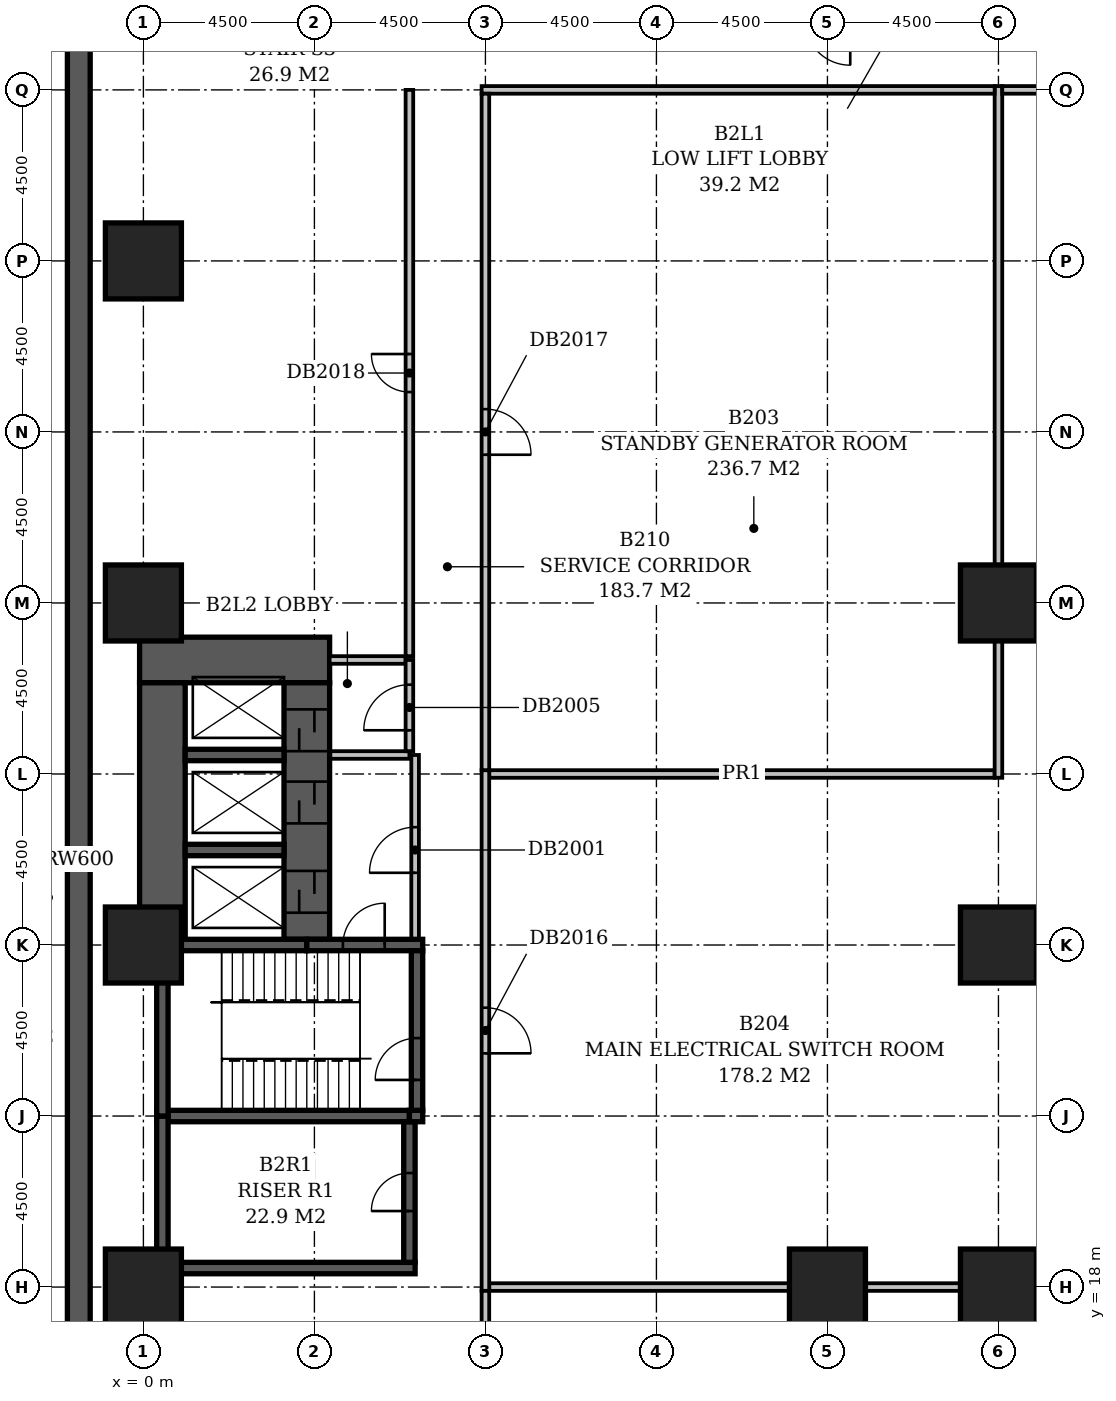
"""IFC4 building model, lengths in metres.
Left out: names, types, materials, properties, quantities, classifications, styles, units other than length and angle.
Written with IfcOpenShell. Run it as: python <this file> out.ifc"""

import sys

from ifc_helpers import new_model, si_unit, direction, frame, frame_2d, origin, origin_2d, place, context, subcontext, project, spatial, rectangle, extrude, element, fill, save


model = new_model("IFC4")
c1 = context("Model", 3, precision=1e-05, world=origin(), true_north=direction((0.0, 1.0)))
c2 = subcontext(c1, "Body", "Model", "MODEL_VIEW")
j1 = project(units=[si_unit("LENGTHUNIT", "METRE"), si_unit("PLANEANGLEUNIT", "RADIAN")], contexts=[c1])
p1 = place(None, origin())
s1 = spatial("IfcSite", under=j1, at=p1, CompositionType="ELEMENT")
p2 = place(p1, origin())
s2 = spatial("IfcBuilding", under=s1, at=p2, CompositionType="ELEMENT")
p3 = place(p2, frame((0.0, 0.0, -9.0)))
s3 = spatial("IfcBuildingStorey", under=s2, at=p3, CompositionType="ELEMENT", Elevation=-9.0)
for number, where, z_axis, x_axis in (
    (1, (0.0, 18.0, 0.0), (0.0, 0.0, 1.0), (1.0, 0.0, 0.0)),
    (2, (18.0, 18.0, 0.0), (0.0, 0.0, 1.0), (1.0, 0.0, 0.0)),
    (3, (22.5, 18.0, 0.0), (0.0, 0.0, 1.0), (1.0, 0.0, 0.0)),
    (4, (0.0, 27.0, 0.0), (0.0, 0.0, 1.0), (1.0, 0.0, 0.0)),
    (5, (22.5, 27.0, 0.0), (0.0, 0.0, 1.0), (1.0, 0.0, 0.0)),
    (6, (0.0, 36.0, 0.0), (0.0, 0.0, 1.0), (1.0, 0.0, 0.0)),
    (7, (22.5, 36.0, 0.0), (0.0, 0.0, 1.0), (1.0, 0.0, 0.0)),
    (8, (0.0, 45.0, 0.0), (0.0, 0.0, 1.0), (1.0, 0.0, 0.0)),
):
    element("IfcColumn", number, at=place(p3, frame(where, z_axis=z_axis, x_axis=x_axis)), inside=s3, PredefinedType="COLUMN", context=c2, shape_type="SweptSolid", body=[
        extrude(rectangle(XDim=2.0, YDim=2.0, at=origin_2d()), origin(), (0.0, 0.0, 1.0), 4.1),
    ])
p4 = place(p3, frame((-1.7, -1.4, 0.0), z_axis=(0.0, 0.0, 1.0), x_axis=(0.0, 1.0, 0.0)))
e9 = element("IfcWall", 9, at=p4, inside=s3, PredefinedType="SOLIDWALL", context=c2, shape_type="SweptSolid", body=[
    extrude(rectangle(XDim=61.3, YDim=0.6, at=frame_2d((30.65, 0.0))), origin(), (0.0, 0.0, 1.0), 4.1),
])
p5 = place(p3, frame((0.35, 18.5, 0.0), z_axis=(0.0, 0.0, 1.0), x_axis=(1.0, 0.0, 0.0)))
e10 = element("IfcWall", 10, at=p5, inside=s3, PredefinedType="SHEAR", context=c2, shape_type="SweptSolid", body=[
    extrude(rectangle(XDim=6.8, YDim=0.3, at=frame_2d((3.4, 0.0))), origin(), (0.0, 0.0, 1.0), 4.1),
])
p6 = place(p3, frame((0.35, 22.5, 0.0), z_axis=(0.0, 0.0, 1.0), x_axis=(1.0, 0.0, 0.0)))
e11 = element("IfcWall", 11, at=p6, inside=s3, PredefinedType="SHEAR", context=c2, shape_type="SweptSolid", body=[
    extrude(rectangle(XDim=6.65, YDim=0.3, at=frame_2d((3.325, 0.0))), origin(), (0.0, 0.0, 1.0), 4.1),
])
p7 = place(p3, frame((7.0, 22.5, 0.0), z_axis=(0.0, 0.0, 1.0), x_axis=(1.0, 0.0, 0.0)))
e12 = element("IfcWall", 12, at=p7, inside=s3, PredefinedType="SHEAR", context=c2, shape_type="SweptSolid", body=[
    extrude(rectangle(XDim=0.35, YDim=0.3, at=frame_2d((0.175, 0.0))), origin(), (0.0, 0.0, 1.0), 4.1),
])
p8 = place(p3, frame((0.35, 27.0, 0.0), z_axis=(0.0, 0.0, 1.0), x_axis=(1.0, 0.0, 0.0)))
e13 = element("IfcWall", 13, at=p8, inside=s3, PredefinedType="SHEAR", context=c2, shape_type="SweptSolid", body=[
    extrude(rectangle(XDim=3.95, YDim=0.3, at=frame_2d((1.975, 0.0))), origin(), (0.0, 0.0, 1.0), 4.1),
])
p9 = place(p3, frame((4.3, 27.0, 0.0), z_axis=(0.0, 0.0, 1.0), x_axis=(1.0, 0.0, 0.0)))
e14 = element("IfcWall", 14, at=p9, inside=s3, PredefinedType="SHEAR", context=c2, shape_type="SweptSolid", body=[
    extrude(rectangle(XDim=3.05, YDim=0.3, at=frame_2d((1.525, 0.0))), origin(), (0.0, 0.0, 1.0), 4.1),
])
p10 = place(p9, frame((0.95, 0.0, 0.0)))
e15 = element("IfcOpeningElement", 15, at=p10, cuts=e14, PredefinedType="OPENING", context=c2, shape_type="SweptSolid", body=[
    extrude(rectangle(XDim=1.1, YDim=2.1, at=frame_2d((0.55, 1.05))), frame((0.0, 0.162, 0.0), z_axis=(0.0, -1.0, 0.0), x_axis=(1.0, 0.0, 0.0)), (0.0, 0.0, 1.0), 0.324),
])
for number, where, z_axis, x_axis in (
    (16, (1.1, 29.5, 0.0), (0.0, 0.0, 1.0), (1.0, 0.0, 0.0)),
    (17, (1.1, 32.0, 0.0), (0.0, 0.0, 1.0), (1.0, 0.0, 0.0)),
):
    element("IfcWall", number, at=place(p3, frame(where, z_axis=z_axis, x_axis=x_axis)), inside=s3, PredefinedType="SHEAR", context=c2, shape_type="SweptSolid", body=[
        extrude(rectangle(XDim=2.6, YDim=0.3, at=frame_2d((1.3, 0.0))), origin(), (0.0, 0.0, 1.0), 4.1),
    ])
p11 = place(p3, frame((-0.1, 34.5, 0.0), z_axis=(0.0, 0.0, 1.0), x_axis=(1.0, 0.0, 0.0)))
e18 = element("IfcWall", 18, at=p11, inside=s3, PredefinedType="SHEAR", context=c2, shape_type="SweptSolid", body=[
    extrude(rectangle(XDim=5.0, YDim=1.2, at=frame_2d((2.5, 0.0))), origin(), (0.0, 0.0, 1.0), 4.1),
])
p12 = place(p3, frame((0.5, 18.65, 0.0), z_axis=(0.0, 0.0, 1.0), x_axis=(0.0, 1.0, 0.0)))
e19 = element("IfcWall", 19, at=p12, inside=s3, PredefinedType="SHEAR", context=c2, shape_type="SweptSolid", body=[
    extrude(rectangle(XDim=3.85, YDim=0.3, at=frame_2d((1.925, 0.0))), origin(), (0.0, 0.0, 1.0), 4.1),
])
p13 = place(p3, frame((0.5, 22.5, 0.0), z_axis=(0.0, 0.0, 1.0), x_axis=(0.0, 1.0, 0.0)))
e20 = element("IfcWall", 20, at=p13, inside=s3, PredefinedType="SHEAR", context=c2, shape_type="SweptSolid", body=[
    extrude(rectangle(XDim=4.5, YDim=0.3, at=frame_2d((2.25, 0.0))), origin(), (0.0, 0.0, 1.0), 4.1),
])
p14 = place(p3, frame((0.5, 27.0, 0.0), z_axis=(0.0, 0.0, 1.0), x_axis=(0.0, 1.0, 0.0)))
e21 = element("IfcWall", 21, at=p14, inside=s3, PredefinedType="SHEAR", context=c2, shape_type="SweptSolid", body=[
    extrude(rectangle(XDim=6.9, YDim=1.2, at=frame_2d((3.45, 0.0))), origin(), (0.0, 0.0, 1.0), 4.1),
])
p15 = place(p3, frame((4.3, 27.15, 0.0), z_axis=(0.0, 0.0, 1.0), x_axis=(0.0, 1.0, 0.0)))
e22 = element("IfcWall", 22, at=p15, inside=s3, PredefinedType="SHEAR", context=c2, shape_type="SweptSolid", body=[
    extrude(rectangle(XDim=6.75, YDim=1.2, at=frame_2d((3.375, 0.0))), origin(), (0.0, 0.0, 1.0), 4.1),
])
p16 = place(p15, frame((3.05, 0.0, 0.0)))
e23 = element("IfcOpeningElement", 23, at=p16, cuts=e22, PredefinedType="OPENING", context=c2, shape_type="SweptSolid", body=[
    extrude(rectangle(XDim=1.1, YDim=2.1, at=frame_2d((0.55, 1.05))), frame((0.0, 0.612, 0.0), z_axis=(0.0, -1.0, 0.0), x_axis=(1.0, 0.0, 0.0)), (0.0, 0.0, 1.0), 1.224),
])
p17 = place(p15, frame((0.7, 0.0, 0.0)))
e24 = element("IfcOpeningElement", 24, at=p17, cuts=e22, PredefinedType="OPENING", context=c2, shape_type="SweptSolid", body=[
    extrude(rectangle(XDim=1.1, YDim=2.1, at=frame_2d((0.55, 1.05))), frame((0.0, 0.612, 0.0), z_axis=(0.0, -1.0, 0.0), x_axis=(1.0, 0.0, 0.0)), (0.0, 0.0, 1.0), 1.224),
])
p18 = place(p15, frame((4.95, 0.0, 0.0)))
e25 = element("IfcOpeningElement", 25, at=p18, cuts=e22, PredefinedType="OPENING", context=c2, shape_type="SweptSolid", body=[
    extrude(rectangle(XDim=1.1, YDim=2.1, at=frame_2d((0.55, 1.05))), frame((0.0, 0.612, 0.0), z_axis=(0.0, -1.0, 0.0), x_axis=(1.0, 0.0, 0.0)), (0.0, 0.0, 1.0), 1.224),
])
p19 = place(p3, frame((7.0, 18.65, 0.0), z_axis=(0.0, 0.0, 1.0), x_axis=(0.0, 1.0, 0.0)))
e26 = element("IfcWall", 26, at=p19, inside=s3, PredefinedType="SHEAR", context=c2, shape_type="SweptSolid", body=[
    extrude(rectangle(XDim=3.7, YDim=0.3, at=frame_2d((1.85, 0.0))), origin(), (0.0, 0.0, 1.0), 4.1),
])
p20 = place(p19, frame((1.35, 0.0, 0.0)))
e27 = element("IfcOpeningElement", 27, at=p20, cuts=e26, PredefinedType="OPENING", context=c2, shape_type="SweptSolid", body=[
    extrude(rectangle(XDim=1.0, YDim=2.1, at=frame_2d((0.5, 1.05))), frame((0.0, 0.162, 0.0), z_axis=(0.0, -1.0, 0.0), x_axis=(1.0, 0.0, 0.0)), (0.0, 0.0, 1.0), 0.324),
])
p21 = place(p3, frame((7.2, 22.65, 0.0), z_axis=(0.0, 0.0, 1.0), x_axis=(0.0, 1.0, 0.0)))
e28 = element("IfcWall", 28, at=p21, inside=s3, PredefinedType="SHEAR", context=c2, shape_type="SweptSolid", body=[
    extrude(rectangle(XDim=4.2, YDim=0.3, at=frame_2d((2.1, 0.0))), origin(), (0.0, 0.0, 1.0), 4.1),
])
p22 = place(p21, frame((0.8, 0.0, 0.0)))
e29 = element("IfcOpeningElement", 29, at=p22, cuts=e28, PredefinedType="OPENING", context=c2, shape_type="SweptSolid", body=[
    extrude(rectangle(XDim=1.1, YDim=2.1, at=frame_2d((0.55, 1.05))), frame((0.0, 0.162, 0.0), z_axis=(0.0, -1.0, 0.0), x_axis=(1.0, 0.0, 0.0)), (0.0, 0.0, 1.0), 0.324),
])
p23 = place(p3, frame((4.92, 32.0, 0.0), z_axis=(0.0, 0.0, 1.0), x_axis=(1.0, 0.0, 0.0)))
e30 = element("IfcWall", 30, at=p23, inside=s3, PredefinedType="PARTITIONING", context=c2, shape_type="SweptSolid", body=[
    extrude(rectangle(XDim=2.08, YDim=0.2, at=frame_2d((1.04, 0.0))), origin(), (0.0, 0.0, 1.0), 4.1),
])
p24 = place(p3, frame((7.0, 32.1, 0.0), z_axis=(0.0, 0.0, 1.0), x_axis=(0.0, 1.0, 0.0)))
e31 = element("IfcWall", 31, at=p24, inside=s3, PredefinedType="PARTITIONING", context=c2, shape_type="SweptSolid", body=[
    extrude(rectangle(XDim=2.4, YDim=0.2, at=frame_2d((1.2, 0.0))), origin(), (0.0, 0.0, 1.0), 4.1),
])
p25 = place(p24, frame((0.55, 0.0, 0.0)))
e32 = element("IfcOpeningElement", 32, at=p25, cuts=e31, PredefinedType="OPENING", context=c2, shape_type="SweptSolid", body=[
    extrude(rectangle(XDim=1.2, YDim=2.1, at=frame_2d((0.6, 1.05))), frame((0.0, 0.112, 0.0), z_axis=(0.0, -1.0, 0.0), x_axis=(1.0, 0.0, 0.0)), (0.0, 0.0, 1.0), 0.224),
])
p26 = place(p3, frame((4.9, 34.5, 0.0), z_axis=(0.0, 0.0, 1.0), x_axis=(1.0, 0.0, 0.0)))
e33 = element("IfcWall", 33, at=p26, inside=s3, PredefinedType="PARTITIONING", context=c2, shape_type="SweptSolid", body=[
    extrude(rectangle(XDim=2.0, YDim=0.2, at=frame_2d((1.0, 0.0))), origin(), (0.0, 0.0, 1.0), 4.1),
])
p27 = place(p3, frame((7.15, 27.17, 0.0), z_axis=(0.0, 0.0, 1.0), x_axis=(0.0, 1.0, 0.0)))
e34 = element("IfcWall", 34, at=p27, inside=s3, PredefinedType="PARTITIONING", context=c2, shape_type="SweptSolid", body=[
    extrude(rectangle(XDim=4.83, YDim=0.2, at=frame_2d((2.415, 0.0))), origin(), (0.0, 0.0, 1.0), 4.1),
])
p28 = place(p27, frame((1.73, 0.0, 0.0)))
e35 = element("IfcOpeningElement", 35, at=p28, cuts=e34, PredefinedType="OPENING", context=c2, shape_type="SweptSolid", body=[
    extrude(rectangle(XDim=1.2, YDim=2.1, at=frame_2d((0.6, 1.05))), frame((0.0, 0.112, 0.0), z_axis=(0.0, -1.0, 0.0), x_axis=(1.0, 0.0, 0.0)), (0.0, 0.0, 1.0), 0.224),
])
p29 = place(p3, frame((9.0, 5.0, 0.0), z_axis=(0.0, 0.0, 1.0), x_axis=(0.0, 1.0, 0.0)))
e36 = element("IfcWall", 36, at=p29, inside=s3, PredefinedType="PARTITIONING", context=c2, shape_type="SweptSolid", body=[
    extrude(rectangle(XDim=12.9, YDim=0.2, at=frame_2d((6.45, 0.0))), origin(), (0.0, 0.0, 1.0), 4.1),
])
p30 = place(p29, frame((5.85, 0.0, 0.0)))
e37 = element("IfcOpeningElement", 37, at=p30, cuts=e36, PredefinedType="OPENING", context=c2, shape_type="SweptSolid", body=[
    extrude(rectangle(XDim=1.2, YDim=2.1, at=frame_2d((0.6, 1.05))), frame((0.0, 0.112, 0.0), z_axis=(0.0, -1.0, 0.0), x_axis=(1.0, 0.0, 0.0)), (0.0, 0.0, 1.0), 0.224),
])
p31 = place(p3, frame((9.0, 17.9, 0.0), z_axis=(0.0, 0.0, 1.0), x_axis=(0.0, 1.0, 0.0)))
e38 = element("IfcWall", 38, at=p31, inside=s3, PredefinedType="PARTITIONING", context=c2, shape_type="SweptSolid", body=[
    extrude(rectangle(XDim=13.7, YDim=0.2, at=frame_2d((6.85, 0.0))), origin(), (0.0, 0.0, 1.0), 4.1),
])
p32 = place(p31, frame((6.25, 0.0, 0.0)))
e39 = element("IfcOpeningElement", 39, at=p32, cuts=e38, PredefinedType="OPENING", context=c2, shape_type="SweptSolid", body=[
    extrude(rectangle(XDim=1.2, YDim=2.1, at=frame_2d((0.6, 1.05))), frame((0.0, 0.112, 0.0), z_axis=(0.0, -1.0, 0.0), x_axis=(1.0, 0.0, 0.0)), (0.0, 0.0, 1.0), 0.224),
])
p33 = place(p3, frame((22.5, 18.0, 0.0), z_axis=(0.0, 0.0, 1.0), x_axis=(-1.0, 0.0, 0.0)))
e40 = element("IfcWall", 40, at=p33, inside=s3, PredefinedType="PARTITIONING", context=c2, shape_type="SweptSolid", body=[
    extrude(rectangle(XDim=13.4, YDim=0.2, at=frame_2d((6.7, 0.0))), origin(), (0.0, 0.0, 1.0), 3.4),
])
p34 = place(p3, frame((9.0, 31.6, 0.0), z_axis=(0.0, 0.0, 1.0), x_axis=(0.0, 1.0, 0.0)))
e41 = element("IfcWall", 41, at=p34, inside=s3, PredefinedType="PARTITIONING", context=c2, shape_type="SweptSolid", body=[
    extrude(rectangle(XDim=17.8, YDim=0.2, at=frame_2d((8.9, 0.0))), origin(), (0.0, 0.0, 1.0), 4.1),
])
p35 = place(p34, frame((8.3, 0.0, 0.0)))
e42 = element("IfcOpeningElement", 42, at=p35, cuts=e41, PredefinedType="OPENING", context=c2, shape_type="SweptSolid", body=[
    extrude(rectangle(XDim=1.2, YDim=2.1, at=frame_2d((0.6, 1.05))), frame((0.0, 0.112, 0.0), z_axis=(0.0, -1.0, 0.0), x_axis=(1.0, 0.0, 0.0)), (0.0, 0.0, 1.0), 0.224),
])
p36 = place(p3, frame((22.4, 31.5, 0.0), z_axis=(0.0, 0.0, 1.0), x_axis=(-1.0, 0.0, 0.0)))
e43 = element("IfcWall", 43, at=p36, inside=s3, PredefinedType="PARTITIONING", context=c2, shape_type="SweptSolid", body=[
    extrude(rectangle(XDim=13.3, YDim=0.2, at=frame_2d((6.65, 0.0))), origin(), (0.0, 0.0, 1.0), 4.1),
])
p37 = place(p3, frame((22.5, 31.4, 0.0), z_axis=(0.0, 0.0, 1.0), x_axis=(0.0, 1.0, 0.0)))
e44 = element("IfcWall", 44, at=p37, inside=s3, PredefinedType="PARTITIONING", context=c2, shape_type="SweptSolid", body=[
    extrude(rectangle(XDim=18.2, YDim=0.2, at=frame_2d((9.1, 0.0))), origin(), (0.0, 0.0, 1.0), 3.6),
])
p38 = place(p3, frame((7.0, 49.5, 0.0), z_axis=(0.0, 0.0, 1.0), x_axis=(0.0, -1.0, 0.0)))
e45 = element("IfcWall", 45, at=p38, inside=s3, PredefinedType="PARTITIONING", context=c2, shape_type="SweptSolid", body=[
    extrude(rectangle(XDim=14.9, YDim=0.2, at=frame_2d((7.45, 0.0))), origin(), (0.0, 0.0, 1.0), 4.1),
])
p39 = place(p38, frame((6.95, 0.0, 0.0)))
e46 = element("IfcOpeningElement", 46, at=p39, cuts=e45, PredefinedType="OPENING", context=c2, shape_type="SweptSolid", body=[
    extrude(rectangle(XDim=1.0, YDim=2.1, at=frame_2d((0.5, 1.05))), frame((0.0, 0.112, 0.0), z_axis=(0.0, -1.0, 0.0), x_axis=(1.0, 0.0, 0.0)), (0.0, 0.0, 1.0), 0.224),
])
p40 = place(p3, frame((8.9, 49.5, 0.0), z_axis=(0.0, 0.0, 1.0), x_axis=(1.0, 0.0, 0.0)))
e47 = element("IfcWall", 47, at=p40, inside=s3, PredefinedType="PARTITIONING", context=c2, shape_type="SweptSolid", body=[
    extrude(rectangle(XDim=13.5, YDim=0.2, at=frame_2d((6.75, 0.0))), origin(), (0.0, 0.0, 1.0), 4.1),
])
p41 = place(p3, frame((22.6, 49.5, 0.0), z_axis=(0.0, 0.0, 1.0), x_axis=(1.0, 0.0, 0.0)))
e48 = element("IfcWall", 48, at=p41, inside=s3, PredefinedType="PARTITIONING", context=c2, shape_type="SweptSolid", body=[
    extrude(rectangle(XDim=22.3, YDim=0.2, at=frame_2d((11.15, 0.0))), origin(), (0.0, 0.0, 1.0), 4.1),
])
p42 = place(p41, frame((10.55, 0.0, 0.0)))
e49 = element("IfcOpeningElement", 49, at=p42, cuts=e48, PredefinedType="OPENING", context=c2, shape_type="SweptSolid", body=[
    extrude(rectangle(XDim=1.2, YDim=2.1, at=frame_2d((0.6, 1.05))), frame((0.0, 0.112, 0.0), z_axis=(0.0, -1.0, 0.0), x_axis=(1.0, 0.0, 0.0)), (0.0, 0.0, 1.0), 0.224),
])
p43 = place(p28, origin())
e50 = element("IfcDoor", 50, at=p43, inside=s3, OperationType="SINGLE_SWING_LEFT", PredefinedType="DOOR", context=c2, shape_type="SweptSolid", body=[
    extrude(rectangle(XDim=1.2, YDim=2.1, at=frame_2d((0.6, 1.05))), frame((0.0, 0.025, 0.0), z_axis=(0.0, -1.0, 0.0), x_axis=(1.0, 0.0, 0.0)), (0.0, 0.0, 1.0), 0.05),
])
fill(e35, e50)
p44 = place(p16, origin())
e51 = element("IfcDoor", 51, at=p44, inside=s3, OperationType="SLIDING_TO_LEFT", PredefinedType="DOOR", context=c2, shape_type="SweptSolid", body=[
    extrude(rectangle(XDim=1.1, YDim=2.1, at=frame_2d((0.55, 1.05))), frame((0.0, 0.025, 0.0), z_axis=(0.0, -1.0, 0.0), x_axis=(1.0, 0.0, 0.0)), (0.0, 0.0, 1.0), 0.05),
])
fill(e23, e51)
p45 = place(p17, origin())
e52 = element("IfcDoor", 52, at=p45, inside=s3, OperationType="SLIDING_TO_LEFT", PredefinedType="DOOR", context=c2, shape_type="SweptSolid", body=[
    extrude(rectangle(XDim=1.1, YDim=2.1, at=frame_2d((0.55, 1.05))), frame((0.0, 0.025, 0.0), z_axis=(0.0, -1.0, 0.0), x_axis=(1.0, 0.0, 0.0)), (0.0, 0.0, 1.0), 0.05),
])
fill(e24, e52)
p46 = place(p25, origin())
e53 = element("IfcDoor", 53, at=p46, inside=s3, OperationType="SINGLE_SWING_LEFT", PredefinedType="DOOR", context=c2, shape_type="SweptSolid", body=[
    extrude(rectangle(XDim=1.2, YDim=2.1, at=frame_2d((0.6, 1.05))), frame((0.0, 0.025, 0.0), z_axis=(0.0, -1.0, 0.0), x_axis=(1.0, 0.0, 0.0)), (0.0, 0.0, 1.0), 0.05),
])
fill(e32, e53)
p47 = place(p18, origin())
e54 = element("IfcDoor", 54, at=p47, inside=s3, OperationType="SLIDING_TO_LEFT", PredefinedType="DOOR", context=c2, shape_type="SweptSolid", body=[
    extrude(rectangle(XDim=1.1, YDim=2.1, at=frame_2d((0.55, 1.05))), frame((0.0, 0.025, 0.0), z_axis=(0.0, -1.0, 0.0), x_axis=(1.0, 0.0, 0.0)), (0.0, 0.0, 1.0), 0.05),
])
fill(e25, e54)
p48 = place(p20, origin())
e55 = element("IfcDoor", 55, at=p48, inside=s3, OperationType="SINGLE_SWING_LEFT", PredefinedType="DOOR", context=c2, shape_type="SweptSolid", body=[
    extrude(rectangle(XDim=1.0, YDim=2.1, at=frame_2d((0.5, 1.05))), frame((0.0, 0.025, 0.0), z_axis=(0.0, -1.0, 0.0), x_axis=(1.0, 0.0, 0.0)), (0.0, 0.0, 1.0), 0.05),
])
fill(e27, e55)
p49 = place(p22, origin())
e56 = element("IfcDoor", 56, at=p49, inside=s3, OperationType="SINGLE_SWING_LEFT", PredefinedType="DOOR", context=c2, shape_type="SweptSolid", body=[
    extrude(rectangle(XDim=1.1, YDim=2.1, at=frame_2d((0.55, 1.05))), frame((0.0, 0.025, 0.0), z_axis=(0.0, -1.0, 0.0), x_axis=(1.0, 0.0, 0.0)), (0.0, 0.0, 1.0), 0.05),
])
fill(e29, e56)
p50 = place(p10, frame((1.1, 0.0, 0.0), z_axis=(0.0, 0.0, 1.0), x_axis=(-1.0, 0.0, 0.0)))
e57 = element("IfcDoor", 57, at=p50, inside=s3, OperationType="SINGLE_SWING_LEFT", PredefinedType="DOOR", context=c2, shape_type="SweptSolid", body=[
    extrude(rectangle(XDim=1.1, YDim=2.1, at=frame_2d((0.55, 1.05))), frame((0.0, 0.025, 0.0), z_axis=(0.0, -1.0, 0.0), x_axis=(1.0, 0.0, 0.0)), (0.0, 0.0, 1.0), 0.05),
])
fill(e15, e57)
p51 = place(p32, frame((1.2, 0.0, 0.0), z_axis=(0.0, 0.0, 1.0), x_axis=(-1.0, 0.0, 0.0)))
e58 = element("IfcDoor", 58, at=p51, inside=s3, OperationType="SINGLE_SWING_RIGHT", PredefinedType="DOOR", context=c2, shape_type="SweptSolid", body=[
    extrude(rectangle(XDim=1.2, YDim=2.1, at=frame_2d((0.6, 1.05))), frame((0.0, 0.025, 0.0), z_axis=(0.0, -1.0, 0.0), x_axis=(1.0, 0.0, 0.0)), (0.0, 0.0, 1.0), 0.05),
])
fill(e39, e58)
p52 = place(p35, frame((1.2, 0.0, 0.0), z_axis=(0.0, 0.0, 1.0), x_axis=(-1.0, 0.0, 0.0)))
e59 = element("IfcDoor", 59, at=p52, inside=s3, OperationType="SINGLE_SWING_RIGHT", PredefinedType="DOOR", context=c2, shape_type="SweptSolid", body=[
    extrude(rectangle(XDim=1.2, YDim=2.1, at=frame_2d((0.6, 1.05))), frame((0.0, 0.025, 0.0), z_axis=(0.0, -1.0, 0.0), x_axis=(1.0, 0.0, 0.0)), (0.0, 0.0, 1.0), 0.05),
])
fill(e42, e59)
p53 = place(p39, frame((1.0, 0.0, 0.0), z_axis=(0.0, 0.0, 1.0), x_axis=(-1.0, 0.0, 0.0)))
e60 = element("IfcDoor", 60, at=p53, inside=s3, OperationType="SINGLE_SWING_RIGHT", PredefinedType="DOOR", context=c2, shape_type="SweptSolid", body=[
    extrude(rectangle(XDim=1.0, YDim=2.1, at=frame_2d((0.5, 1.05))), frame((0.0, 0.025, 0.0), z_axis=(0.0, -1.0, 0.0), x_axis=(1.0, 0.0, 0.0)), (0.0, 0.0, 1.0), 0.05),
])
fill(e46, e60)
save(model, sys.argv[1])
